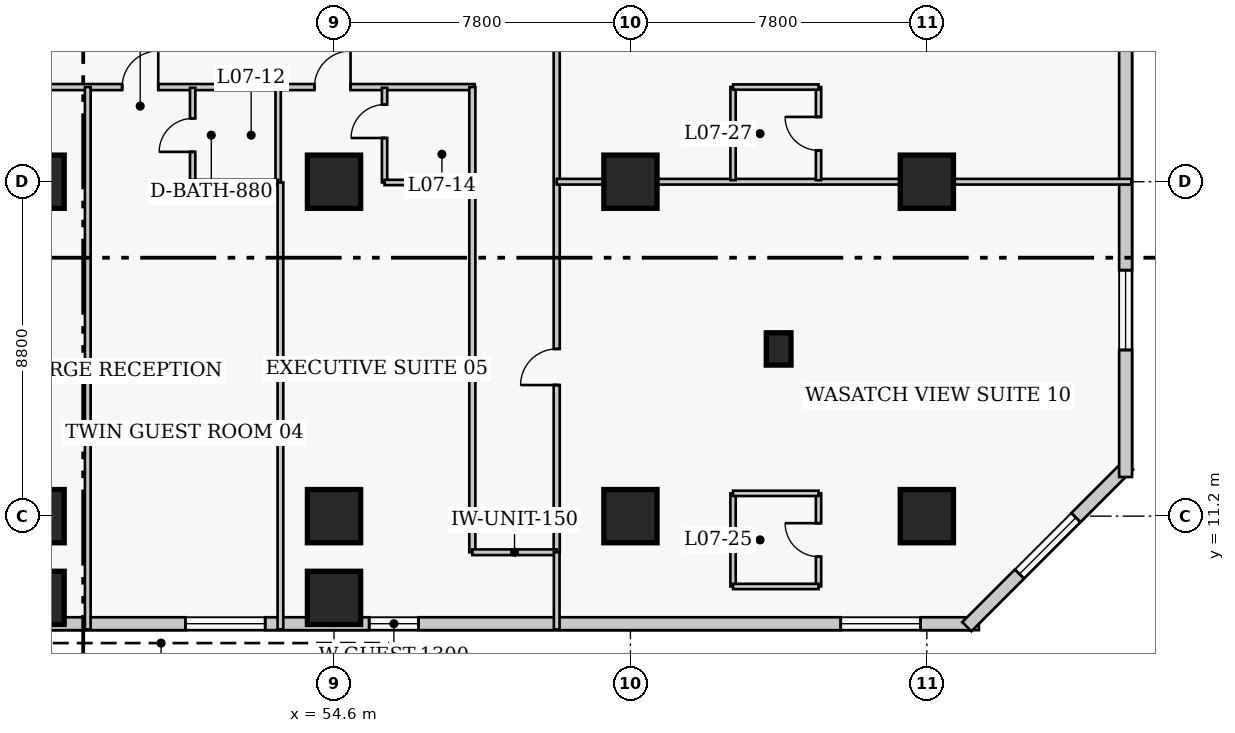
"""IFC4 building model, lengths in metres.
Left out: names, types, materials, properties, quantities, classifications, styles, units other than length and angle.
Written with IfcOpenShell. Run it as: python <this file> out.ifc"""

import sys

from ifc_helpers import new_model, si_unit, direction, frame, frame_2d, origin, origin_2d, place, context, subcontext, project, spatial, rectangle, extrude, element, fill, save


model = new_model("IFC4")
c1 = context("Model", 3, precision=1e-05, world=origin(), true_north=direction((0.0, 1.0)))
c2 = subcontext(c1, "Body", "Model", "MODEL_VIEW")
j1 = project(units=[si_unit("LENGTHUNIT", "METRE"), si_unit("PLANEANGLEUNIT", "RADIAN")], contexts=[c1])
p1 = place(None, origin())
s1 = spatial("IfcSite", under=j1, at=p1, CompositionType="ELEMENT")
p2 = place(p1, origin())
s2 = spatial("IfcBuilding", under=s1, at=p2, CompositionType="ELEMENT")
p3 = place(p2, frame((0.0, 0.0, 33.6)))
s3 = spatial("IfcBuildingStorey", under=s2, at=p3, CompositionType="ELEMENT", Elevation=33.6)
for number, where, z_axis, x_axis in (
    (1, (46.8, 11.2, 0.0), (0.0, 0.0, 1.0), (1.0, 0.0, 0.0)),
    (2, (46.8, 20.0, 0.0), (0.0, 0.0, 1.0), (1.0, 0.0, 0.0)),
    (3, (54.6, 11.2, 0.0), (0.0, 0.0, 1.0), (1.0, 0.0, 0.0)),
    (4, (54.6, 20.0, 0.0), (0.0, 0.0, 1.0), (1.0, 0.0, 0.0)),
    (5, (62.4, 11.2, 0.0), (0.0, 0.0, 1.0), (1.0, 0.0, 0.0)),
    (6, (62.4, 20.0, 0.0), (0.0, 0.0, 1.0), (1.0, 0.0, 0.0)),
    (7, (70.2, 11.2, 0.0), (0.0, 0.0, 1.0), (1.0, 0.0, 0.0)),
    (8, (70.2, 20.0, 0.0), (0.0, 0.0, 1.0), (1.0, 0.0, 0.0)),
    (9, (46.8, 9.05, 0.0), (0.0, 0.0, 1.0), (1.0, 0.0, 0.0)),
    (10, (54.6, 9.05, 0.0), (0.0, 0.0, 1.0), (1.0, 0.0, 0.0)),
):
    element("IfcColumn", number, at=place(p3, frame(where, z_axis=z_axis, x_axis=x_axis)), inside=s3, PredefinedType="COLUMN", context=c2, shape_type="SweptSolid", body=[
        extrude(rectangle(XDim=1.4, YDim=1.4, at=origin_2d()), origin(), (0.0, 0.0, 1.0), 3.8),
    ])
p4 = place(p3, frame((66.3, 15.6, 0.0), z_axis=(0.0, 0.0, 1.0), x_axis=(1.0, 0.0, 0.0)))
e11 = element("IfcColumn", 11, at=p4, inside=s3, PredefinedType="PILASTER", context=c2, shape_type="SweptSolid", body=[
    extrude(rectangle(XDim=0.65, YDim=0.85, at=origin_2d()), origin(), (0.0, 0.0, 1.0), 3.8),
])
p5 = place(p3, frame((41.68, 8.37, 0.0), z_axis=(0.0, 0.0, 1.0), x_axis=(1.0, 0.0, 0.0)))
e12 = element("IfcWall", 12, at=p5, inside=s3, PredefinedType="SOLIDWALL", context=c2, shape_type="SweptSolid", body=[
    extrude(rectangle(XDim=29.89, YDim=0.34, at=frame_2d((14.945, 0.0))), origin(), (0.0, 0.0, 1.0), 3.54),
])
p6 = place(p5, frame((2.036, 0.0, 0.85)))
e13 = element("IfcOpeningElement", 13, at=p6, cuts=e12, PredefinedType="OPENING", context=c2, shape_type="SweptSolid", body=[
    extrude(rectangle(XDim=2.1, YDim=1.85, at=frame_2d((1.05, 0.925))), frame((0.0, 0.18, 0.0), z_axis=(0.0, -1.0, 0.0), x_axis=(1.0, 0.0, 0.0)), (0.0, 0.0, 1.0), 0.36),
])
p7 = place(p5, frame((9.009, 0.0, 0.85)))
e14 = element("IfcOpeningElement", 14, at=p7, cuts=e12, PredefinedType="OPENING", context=c2, shape_type="SweptSolid", body=[
    extrude(rectangle(XDim=2.1, YDim=1.85, at=frame_2d((1.05, 0.925))), frame((0.0, 0.18, 0.0), z_axis=(0.0, -1.0, 0.0), x_axis=(1.0, 0.0, 0.0)), (0.0, 0.0, 1.0), 0.36),
])
p8 = place(p5, frame((26.254, 0.0, 0.85)))
e15 = element("IfcOpeningElement", 15, at=p8, cuts=e12, PredefinedType="OPENING", context=c2, shape_type="SweptSolid", body=[
    extrude(rectangle(XDim=2.1, YDim=1.85, at=frame_2d((1.05, 0.925))), frame((0.0, 0.18, 0.0), z_axis=(0.0, -1.0, 0.0), x_axis=(1.0, 0.0, 0.0)), (0.0, 0.0, 1.0), 0.36),
])
p9 = place(p5, frame((13.845, 0.0, 0.85)))
e16 = element("IfcOpeningElement", 16, at=p9, cuts=e12, PredefinedType="OPENING", context=c2, shape_type="SweptSolid", body=[
    extrude(rectangle(XDim=1.3, YDim=1.7, at=frame_2d((0.65, 0.85))), frame((0.0, 0.18, 0.0), z_axis=(0.0, -1.0, 0.0), x_axis=(1.0, 0.0, 0.0)), (0.0, 0.0, 1.0), 0.36),
])
p10 = place(p3, frame((71.251, 8.292, 0.0), z_axis=(0.0, 0.0, 1.0), x_axis=(0.707106781187, 0.707106781187, 0.0)))
e17 = element("IfcWall", 17, at=p10, inside=s3, PredefinedType="SOLIDWALL", context=c2, shape_type="SweptSolid", body=[
    extrude(rectangle(XDim=6.02, YDim=0.34, at=frame_2d((3.01, 0.0))), origin(), (0.0, 0.0, 1.0), 3.54),
])
p11 = place(p10, frame((1.96, 0.0, 0.85)))
e18 = element("IfcOpeningElement", 18, at=p11, cuts=e17, PredefinedType="OPENING", context=c2, shape_type="SweptSolid", body=[
    extrude(rectangle(XDim=2.1, YDim=1.85, at=frame_2d((1.05, 0.925))), frame((0.0, 0.18, 0.0), z_axis=(0.0, -1.0, 0.0), x_axis=(1.0, 0.0, 0.0)), (0.0, 0.0, 1.0), 0.36),
])
p12 = place(p3, frame((75.43, 12.23, 0.0), z_axis=(0.0, 0.0, 1.0), x_axis=(0.0, 1.0, 0.0)))
e19 = element("IfcWall", 19, at=p12, inside=s3, PredefinedType="SOLIDWALL", context=c2, shape_type="SweptSolid", body=[
    extrude(rectangle(XDim=35.14, YDim=0.34, at=frame_2d((17.57, 0.0))), origin(), (0.0, 0.0, 1.0), 3.54),
])
p13 = place(p12, frame((3.343, 0.0, 0.85)))
e20 = element("IfcOpeningElement", 20, at=p13, cuts=e19, PredefinedType="OPENING", context=c2, shape_type="SweptSolid", body=[
    extrude(rectangle(XDim=2.1, YDim=1.85, at=frame_2d((1.05, 0.925))), frame((0.0, 0.18, 0.0), z_axis=(0.0, -1.0, 0.0), x_axis=(1.0, 0.0, 0.0)), (0.0, 0.0, 1.0), 0.36),
])
p14 = place(p12, frame((12.127, 0.0, 0.85)))
e21 = element("IfcOpeningElement", 21, at=p14, cuts=e19, PredefinedType="OPENING", context=c2, shape_type="SweptSolid", body=[
    extrude(rectangle(XDim=2.1, YDim=1.85, at=frame_2d((1.05, 0.925))), frame((0.0, 0.18, 0.0), z_axis=(0.0, -1.0, 0.0), x_axis=(1.0, 0.0, 0.0)), (0.0, 0.0, 1.0), 0.36),
])
p15 = place(p12, frame((20.913, 0.0, 0.85)))
e22 = element("IfcOpeningElement", 22, at=p15, cuts=e19, PredefinedType="OPENING", context=c2, shape_type="SweptSolid", body=[
    extrude(rectangle(XDim=2.1, YDim=1.85, at=frame_2d((1.05, 0.925))), frame((0.0, 0.18, 0.0), z_axis=(0.0, -1.0, 0.0), x_axis=(1.0, 0.0, 0.0)), (0.0, 0.0, 1.0), 0.36),
])
p16 = place(p12, frame((29.698, 0.0, 0.85)))
e23 = element("IfcOpeningElement", 23, at=p16, cuts=e19, PredefinedType="OPENING", context=c2, shape_type="SweptSolid", body=[
    extrude(rectangle(XDim=2.1, YDim=1.85, at=frame_2d((1.05, 0.925))), frame((0.0, 0.18, 0.0), z_axis=(0.0, -1.0, 0.0), x_axis=(1.0, 0.0, 0.0)), (0.0, 0.0, 1.0), 0.36),
])
p17 = place(p3, frame((35.8, 22.49, 0.0), z_axis=(0.0, 0.0, 1.0), x_axis=(1.0, 0.0, 0.0)))
e24 = element("IfcWall", 24, at=p17, inside=s3, PredefinedType="PARTITIONING", context=c2, shape_type="SweptSolid", body=[
    extrude(rectangle(XDim=22.5, YDim=0.16, at=frame_2d((11.25, 0.0))), origin(), (0.0, 0.0, 1.0), 3.54),
])
p18 = place(p17, frame((1.43, 0.0, 0.0)))
e25 = element("IfcOpeningElement", 25, at=p18, cuts=e24, PredefinedType="OPENING", context=c2, shape_type="SweptSolid", body=[
    extrude(rectangle(XDim=0.95, YDim=2.1, at=frame_2d((0.475, 1.05))), frame((0.0, 0.09, 0.0), z_axis=(0.0, -1.0, 0.0), x_axis=(1.0, 0.0, 0.0)), (0.0, 0.0, 1.0), 0.18),
])
p19 = place(p17, frame((9.015, 0.0, 0.0)))
e26 = element("IfcOpeningElement", 26, at=p19, cuts=e24, PredefinedType="OPENING", context=c2, shape_type="SweptSolid", body=[
    extrude(rectangle(XDim=1.0, YDim=2.15, at=frame_2d((0.5, 1.075))), frame((0.0, 0.09, 0.0), z_axis=(0.0, -1.0, 0.0), x_axis=(1.0, 0.0, 0.0)), (0.0, 0.0, 1.0), 0.18),
])
p20 = place(p17, frame((13.225, 0.0, 0.0)))
e27 = element("IfcOpeningElement", 27, at=p20, cuts=e24, PredefinedType="OPENING", context=c2, shape_type="SweptSolid", body=[
    extrude(rectangle(XDim=0.95, YDim=2.1, at=frame_2d((0.475, 1.05))), frame((0.0, 0.09, 0.0), z_axis=(0.0, -1.0, 0.0), x_axis=(1.0, 0.0, 0.0)), (0.0, 0.0, 1.0), 0.18),
])
p21 = place(p17, frame((18.285, 0.0, 0.0)))
e28 = element("IfcOpeningElement", 28, at=p21, cuts=e24, PredefinedType="OPENING", context=c2, shape_type="SweptSolid", body=[
    extrude(rectangle(XDim=0.95, YDim=2.1, at=frame_2d((0.475, 1.05))), frame((0.0, 0.09, 0.0), z_axis=(0.0, -1.0, 0.0), x_axis=(1.0, 0.0, 0.0)), (0.0, 0.0, 1.0), 0.18),
])
p22 = place(p3, frame((60.46, 10.25, 0.0), z_axis=(0.0, 0.0, 1.0), x_axis=(0.0, 1.0, 0.0)))
e29 = element("IfcWall", 29, at=p22, inside=s3, PredefinedType="PARTITIONING", context=c2, shape_type="SweptSolid", body=[
    extrude(rectangle(XDim=30.4, YDim=0.16, at=frame_2d((15.2, 0.0))), origin(), (0.0, 0.0, 1.0), 3.54),
])
p23 = place(p22, frame((4.4, 0.0, 0.0)))
e30 = element("IfcOpeningElement", 30, at=p23, cuts=e29, PredefinedType="OPENING", context=c2, shape_type="SweptSolid", body=[
    extrude(rectangle(XDim=0.95, YDim=2.1, at=frame_2d((0.475, 1.05))), frame((0.0, 0.09, 0.0), z_axis=(0.0, -1.0, 0.0), x_axis=(1.0, 0.0, 0.0)), (0.0, 0.0, 1.0), 0.18),
])
p24 = place(p22, frame((13.675, 0.0, 0.0)))
e31 = element("IfcOpeningElement", 31, at=p24, cuts=e29, PredefinedType="OPENING", context=c2, shape_type="SweptSolid", body=[
    extrude(rectangle(XDim=0.95, YDim=2.1, at=frame_2d((0.475, 1.05))), frame((0.0, 0.09, 0.0), z_axis=(0.0, -1.0, 0.0), x_axis=(1.0, 0.0, 0.0)), (0.0, 0.0, 1.0), 0.18),
])
p25 = place(p22, frame((21.475, 0.0, 0.0)))
e32 = element("IfcOpeningElement", 32, at=p25, cuts=e29, PredefinedType="OPENING", context=c2, shape_type="SweptSolid", body=[
    extrude(rectangle(XDim=0.95, YDim=2.1, at=frame_2d((0.475, 1.05))), frame((0.0, 0.09, 0.0), z_axis=(0.0, -1.0, 0.0), x_axis=(1.0, 0.0, 0.0)), (0.0, 0.0, 1.0), 0.18),
])
p26 = place(p22, frame((25.9, 0.0, 0.0)))
e33 = element("IfcOpeningElement", 33, at=p26, cuts=e29, PredefinedType="OPENING", context=c2, shape_type="SweptSolid", body=[
    extrude(rectangle(XDim=1.0, YDim=2.15, at=frame_2d((0.5, 1.075))), frame((0.0, 0.09, 0.0), z_axis=(0.0, -1.0, 0.0), x_axis=(1.0, 0.0, 0.0)), (0.0, 0.0, 1.0), 0.18),
])
p27 = place(p3, frame((58.24, 10.25, 0.0), z_axis=(0.0, 0.0, 1.0), x_axis=(0.0, 1.0, 0.0)))
e34 = element("IfcWall", 34, at=p27, inside=s3, PredefinedType="PARTITIONING", context=c2, shape_type="SweptSolid", body=[
    extrude(rectangle(XDim=12.24, YDim=0.16, at=frame_2d((6.12, 0.0))), origin(), (0.0, 0.0, 1.0), 3.54),
])
p28 = place(p3, frame((58.24, 10.25, 0.0), z_axis=(0.0, 0.0, 1.0), x_axis=(1.0, 0.0, 0.0)))
e35 = element("IfcWall", 35, at=p28, inside=s3, PredefinedType="PARTITIONING", context=c2, shape_type="SweptSolid", body=[
    extrude(rectangle(XDim=2.22, YDim=0.15, at=frame_2d((1.11, 0.0))), origin(), (0.0, 0.0, 1.0), 3.54),
])
p29 = place(p3, frame((48.12, 8.22, 0.0), z_axis=(0.0, 0.0, 1.0), x_axis=(0.0, 1.0, 0.0)))
e36 = element("IfcWall", 36, at=p29, inside=s3, PredefinedType="PARTITIONING", context=c2, shape_type="SweptSolid", body=[
    extrude(rectangle(XDim=14.27, YDim=0.15, at=frame_2d((7.135, 0.0))), origin(), (0.0, 0.0, 1.0), 3.54),
])
p30 = place(p3, frame((50.88, 19.98, 0.0), z_axis=(0.0, 0.0, 1.0), x_axis=(0.0, 1.0, 0.0)))
e37 = element("IfcWall", 37, at=p30, inside=s3, PredefinedType="PLUMBINGWALL", context=c2, shape_type="SweptSolid", body=[
    extrude(rectangle(XDim=2.49, YDim=0.14, at=frame_2d((1.245, 0.0))), origin(), (0.0, 0.0, 1.0), 3.54),
])
p31 = place(p30, frame((0.805, 0.0, 0.0)))
e38 = element("IfcOpeningElement", 38, at=p31, cuts=e37, PredefinedType="OPENING", context=c2, shape_type="SweptSolid", body=[
    extrude(rectangle(XDim=0.88, YDim=2.05, at=frame_2d((0.44, 1.025))), frame((0.0, 0.08, 0.0), z_axis=(0.0, -1.0, 0.0), x_axis=(1.0, 0.0, 0.0)), (0.0, 0.0, 1.0), 0.16),
])
p32 = place(p3, frame((53.13, 19.98, 0.0), z_axis=(0.0, 0.0, 1.0), x_axis=(0.0, 1.0, 0.0)))
e39 = element("IfcWall", 39, at=p32, inside=s3, PredefinedType="PLUMBINGWALL", context=c2, shape_type="SweptSolid", body=[
    extrude(rectangle(XDim=2.49, YDim=0.14, at=frame_2d((1.245, 0.0))), origin(), (0.0, 0.0, 1.0), 3.54),
])
p33 = place(p3, frame((50.88, 19.98, 0.0), z_axis=(0.0, 0.0, 1.0), x_axis=(1.0, 0.0, 0.0)))
e40 = element("IfcWall", 40, at=p33, inside=s3, PredefinedType="PLUMBINGWALL", context=c2, shape_type="SweptSolid", body=[
    extrude(rectangle(XDim=2.25, YDim=0.14, at=frame_2d((1.125, 0.0))), origin(), (0.0, 0.0, 1.0), 2.593),
])
p34 = place(p3, frame((53.19, 8.22, 0.0), z_axis=(0.0, 0.0, 1.0), x_axis=(0.0, 1.0, 0.0)))
e41 = element("IfcWall", 41, at=p34, inside=s3, PredefinedType="PARTITIONING", context=c2, shape_type="SweptSolid", body=[
    extrude(rectangle(XDim=11.76, YDim=0.15, at=frame_2d((5.88, 0.0))), origin(), (0.0, 0.0, 1.0), 3.54),
])
p35 = place(p3, frame((55.93, 19.98, 0.0), z_axis=(0.0, 0.0, 1.0), x_axis=(0.0, 1.0, 0.0)))
e42 = element("IfcWall", 42, at=p35, inside=s3, PredefinedType="PLUMBINGWALL", context=c2, shape_type="SweptSolid", body=[
    extrude(rectangle(XDim=2.49, YDim=0.14, at=frame_2d((1.245, 0.0))), origin(), (0.0, 0.0, 1.0), 3.54),
])
p36 = place(p35, frame((1.17, 0.0, 0.0)))
e43 = element("IfcOpeningElement", 43, at=p36, cuts=e42, PredefinedType="OPENING", context=c2, shape_type="SweptSolid", body=[
    extrude(rectangle(XDim=0.88, YDim=2.05, at=frame_2d((0.44, 1.025))), frame((0.0, 0.08, 0.0), z_axis=(0.0, -1.0, 0.0), x_axis=(1.0, 0.0, 0.0)), (0.0, 0.0, 1.0), 0.16),
])
p37 = place(p3, frame((55.93, 19.98, 0.0), z_axis=(0.0, 0.0, 1.0), x_axis=(1.0, 0.0, 0.0)))
e44 = element("IfcWall", 44, at=p37, inside=s3, PredefinedType="PLUMBINGWALL", context=c2, shape_type="SweptSolid", body=[
    extrude(rectangle(XDim=2.25, YDim=0.14, at=frame_2d((1.125, 0.0))), origin(), (0.0, 0.0, 1.0), 2.593),
])
p38 = place(p3, frame((60.46, 8.22, 0.0), z_axis=(0.0, 0.0, 1.0), x_axis=(0.0, 1.0, 0.0)))
e45 = element("IfcWall", 45, at=p38, inside=s3, PredefinedType="PARTITIONING", context=c2, shape_type="SweptSolid", body=[
    extrude(rectangle(XDim=2.03, YDim=0.15, at=frame_2d((1.015, 0.0))), origin(), (0.0, 0.0, 1.0), 3.54),
])
p39 = place(p3, frame((65.1, 9.35, 0.0), z_axis=(0.0, 0.0, 1.0), x_axis=(0.0, 1.0, 0.0)))
e46 = element("IfcWall", 46, at=p39, inside=s3, PredefinedType="PLUMBINGWALL", context=c2, shape_type="SweptSolid", body=[
    extrude(rectangle(XDim=2.45, YDim=0.14, at=frame_2d((1.225, 0.0))), origin(), (0.0, 0.0, 1.0), 3.54),
])
p40 = place(p3, frame((67.35, 9.35, 0.0), z_axis=(0.0, 0.0, 1.0), x_axis=(0.0, 1.0, 0.0)))
e47 = element("IfcWall", 47, at=p40, inside=s3, PredefinedType="PLUMBINGWALL", context=c2, shape_type="SweptSolid", body=[
    extrude(rectangle(XDim=2.45, YDim=0.14, at=frame_2d((1.225, 0.0))), origin(), (0.0, 0.0, 1.0), 3.54),
])
p41 = place(p40, frame((0.785, 0.0, 0.0)))
e48 = element("IfcOpeningElement", 48, at=p41, cuts=e47, PredefinedType="OPENING", context=c2, shape_type="SweptSolid", body=[
    extrude(rectangle(XDim=0.88, YDim=2.05, at=frame_2d((0.44, 1.025))), frame((0.0, 0.08, 0.0), z_axis=(0.0, -1.0, 0.0), x_axis=(1.0, 0.0, 0.0)), (0.0, 0.0, 1.0), 0.16),
])
for number, where, z_axis, x_axis in (
    (49, (65.1, 9.35, 0.0), (0.0, 0.0, 1.0), (1.0, 0.0, 0.0)),
    (50, (65.1, 11.8, 0.0), (0.0, 0.0, 1.0), (1.0, 0.0, 0.0)),
):
    element("IfcWall", number, at=place(p3, frame(where, z_axis=z_axis, x_axis=x_axis)), inside=s3, PredefinedType="PLUMBINGWALL", context=c2, shape_type="SweptSolid", body=[
        extrude(rectangle(XDim=2.25, YDim=0.14, at=frame_2d((1.125, 0.0))), origin(), (0.0, 0.0, 1.0), 3.54),
    ])
p42 = place(p3, frame((60.46, 20.0, 0.0), z_axis=(0.0, 0.0, 1.0), x_axis=(1.0, 0.0, 0.0)))
e51 = element("IfcWall", 51, at=p42, inside=s3, PredefinedType="PARTITIONING", context=c2, shape_type="SweptSolid", body=[
    extrude(rectangle(XDim=15.12, YDim=0.15, at=frame_2d((7.56, 0.0))), origin(), (0.0, 0.0, 1.0), 2.593),
])
p43 = place(p3, frame((65.1, 20.04, 0.0), z_axis=(0.0, 0.0, 1.0), x_axis=(0.0, 1.0, 0.0)))
e52 = element("IfcWall", 52, at=p43, inside=s3, PredefinedType="PLUMBINGWALL", context=c2, shape_type="SweptSolid", body=[
    extrude(rectangle(XDim=2.45, YDim=0.14, at=frame_2d((1.225, 0.0))), origin(), (0.0, 0.0, 1.0), 3.54),
])
p44 = place(p3, frame((67.35, 20.04, 0.0), z_axis=(0.0, 0.0, 1.0), x_axis=(0.0, 1.0, 0.0)))
e53 = element("IfcWall", 53, at=p44, inside=s3, PredefinedType="PLUMBINGWALL", context=c2, shape_type="SweptSolid", body=[
    extrude(rectangle(XDim=2.45, YDim=0.14, at=frame_2d((1.225, 0.0))), origin(), (0.0, 0.0, 1.0), 3.54),
])
p45 = place(p44, frame((0.785, 0.0, 0.0)))
e54 = element("IfcOpeningElement", 54, at=p45, cuts=e53, PredefinedType="OPENING", context=c2, shape_type="SweptSolid", body=[
    extrude(rectangle(XDim=0.88, YDim=2.05, at=frame_2d((0.44, 1.025))), frame((0.0, 0.08, 0.0), z_axis=(0.0, -1.0, 0.0), x_axis=(1.0, 0.0, 0.0)), (0.0, 0.0, 1.0), 0.16),
])
p46 = place(p3, frame((65.1, 22.49, 0.0), z_axis=(0.0, 0.0, 1.0), x_axis=(1.0, 0.0, 0.0)))
e55 = element("IfcWall", 55, at=p46, inside=s3, PredefinedType="PLUMBINGWALL", context=c2, shape_type="SweptSolid", body=[
    extrude(rectangle(XDim=2.25, YDim=0.14, at=frame_2d((1.125, 0.0))), origin(), (0.0, 0.0, 1.0), 3.54),
])
p47 = place(p7, origin())
e56 = element("IfcWindow", 56, at=p47, inside=s3, PartitioningType="SINGLE_PANEL", PredefinedType="WINDOW", context=c2, shape_type="SweptSolid", body=[
    extrude(rectangle(XDim=2.1, YDim=1.85, at=frame_2d((1.05, 0.925))), frame((0.0, 0.03, 0.0), z_axis=(0.0, -1.0, 0.0), x_axis=(1.0, 0.0, 0.0)), (0.0, 0.0, 1.0), 0.06),
])
fill(e14, e56)
p48 = place(p8, origin())
e57 = element("IfcWindow", 57, at=p48, inside=s3, PartitioningType="SINGLE_PANEL", PredefinedType="WINDOW", context=c2, shape_type="SweptSolid", body=[
    extrude(rectangle(XDim=2.1, YDim=1.85, at=frame_2d((1.05, 0.925))), frame((0.0, 0.03, 0.0), z_axis=(0.0, -1.0, 0.0), x_axis=(1.0, 0.0, 0.0)), (0.0, 0.0, 1.0), 0.06),
])
fill(e15, e57)
p49 = place(p11, origin())
e58 = element("IfcWindow", 58, at=p49, inside=s3, PartitioningType="SINGLE_PANEL", PredefinedType="WINDOW", context=c2, shape_type="SweptSolid", body=[
    extrude(rectangle(XDim=2.1, YDim=1.85, at=frame_2d((1.05, 0.925))), frame((0.0, 0.03, 0.0), z_axis=(0.0, -1.0, 0.0), x_axis=(1.0, 0.0, 0.0)), (0.0, 0.0, 1.0), 0.06),
])
fill(e18, e58)
p50 = place(p13, origin())
e59 = element("IfcWindow", 59, at=p50, inside=s3, PartitioningType="SINGLE_PANEL", PredefinedType="WINDOW", context=c2, shape_type="SweptSolid", body=[
    extrude(rectangle(XDim=2.1, YDim=1.85, at=frame_2d((1.05, 0.925))), frame((0.0, 0.03, 0.0), z_axis=(0.0, -1.0, 0.0), x_axis=(1.0, 0.0, 0.0)), (0.0, 0.0, 1.0), 0.06),
])
fill(e20, e59)
p51 = place(p9, origin())
e60 = element("IfcWindow", 60, at=p51, inside=s3, PartitioningType="SINGLE_PANEL", PredefinedType="WINDOW", context=c2, shape_type="SweptSolid", body=[
    extrude(rectangle(XDim=1.3, YDim=1.7, at=frame_2d((0.65, 0.85))), frame((0.0, 0.03, 0.0), z_axis=(0.0, -1.0, 0.0), x_axis=(1.0, 0.0, 0.0)), (0.0, 0.0, 1.0), 0.06),
])
fill(e16, e60)
p52 = place(p31, origin())
e61 = element("IfcDoor", 61, at=p52, inside=s3, OperationType="SINGLE_SWING_LEFT", PredefinedType="DOOR", context=c2, shape_type="SweptSolid", body=[
    extrude(rectangle(XDim=0.88, YDim=2.05, at=frame_2d((0.44, 1.025))), frame((0.0, 0.025, 0.0), z_axis=(0.0, -1.0, 0.0), x_axis=(1.0, 0.0, 0.0)), (0.0, 0.0, 1.0), 0.05),
])
fill(e38, e61)
p53 = place(p20, origin())
e62 = element("IfcDoor", 62, at=p53, inside=s3, OperationType="SINGLE_SWING_RIGHT", PredefinedType="DOOR", context=c2, shape_type="SweptSolid", body=[
    extrude(rectangle(XDim=0.95, YDim=2.1, at=frame_2d((0.475, 1.05))), frame((0.0, 0.025, 0.0), z_axis=(0.0, -1.0, 0.0), x_axis=(1.0, 0.0, 0.0)), (0.0, 0.0, 1.0), 0.05),
])
fill(e27, e62)
p54 = place(p36, origin())
e63 = element("IfcDoor", 63, at=p54, inside=s3, OperationType="SINGLE_SWING_LEFT", PredefinedType="DOOR", context=c2, shape_type="SweptSolid", body=[
    extrude(rectangle(XDim=0.88, YDim=2.05, at=frame_2d((0.44, 1.025))), frame((0.0, 0.025, 0.0), z_axis=(0.0, -1.0, 0.0), x_axis=(1.0, 0.0, 0.0)), (0.0, 0.0, 1.0), 0.05),
])
fill(e43, e63)
p55 = place(p21, origin())
e64 = element("IfcDoor", 64, at=p55, inside=s3, OperationType="SINGLE_SWING_RIGHT", PredefinedType="DOOR", context=c2, shape_type="SweptSolid", body=[
    extrude(rectangle(XDim=0.95, YDim=2.1, at=frame_2d((0.475, 1.05))), frame((0.0, 0.025, 0.0), z_axis=(0.0, -1.0, 0.0), x_axis=(1.0, 0.0, 0.0)), (0.0, 0.0, 1.0), 0.05),
])
fill(e28, e64)
p56 = place(p41, origin())
e65 = element("IfcDoor", 65, at=p56, inside=s3, OperationType="SINGLE_SWING_RIGHT", PredefinedType="DOOR", context=c2, shape_type="SweptSolid", body=[
    extrude(rectangle(XDim=0.88, YDim=2.05, at=frame_2d((0.44, 1.025))), frame((0.0, 0.025, 0.0), z_axis=(0.0, -1.0, 0.0), x_axis=(1.0, 0.0, 0.0)), (0.0, 0.0, 1.0), 0.05),
])
fill(e48, e65)
p57 = place(p23, origin())
e66 = element("IfcDoor", 66, at=p57, inside=s3, OperationType="SINGLE_SWING_LEFT", PredefinedType="DOOR", context=c2, shape_type="SweptSolid", body=[
    extrude(rectangle(XDim=0.95, YDim=2.1, at=frame_2d((0.475, 1.05))), frame((0.0, 0.025, 0.0), z_axis=(0.0, -1.0, 0.0), x_axis=(1.0, 0.0, 0.0)), (0.0, 0.0, 1.0), 0.05),
])
fill(e30, e66)
p58 = place(p45, origin())
e67 = element("IfcDoor", 67, at=p58, inside=s3, OperationType="SINGLE_SWING_RIGHT", PredefinedType="DOOR", context=c2, shape_type="SweptSolid", body=[
    extrude(rectangle(XDim=0.88, YDim=2.05, at=frame_2d((0.44, 1.025))), frame((0.0, 0.025, 0.0), z_axis=(0.0, -1.0, 0.0), x_axis=(1.0, 0.0, 0.0)), (0.0, 0.0, 1.0), 0.05),
])
fill(e54, e67)
save(model, sys.argv[1])
